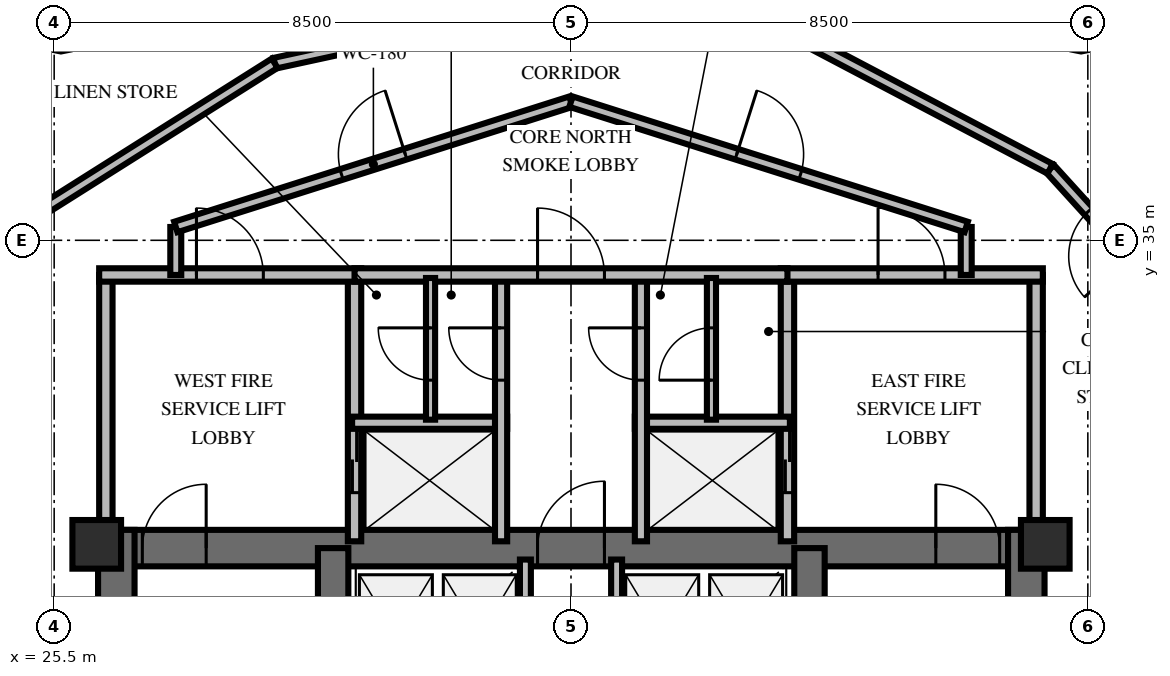
"""IFC4 building model, lengths in metres.
Left out: names, types, materials, properties, quantities, classifications, styles, units other than length and angle.
Written with IfcOpenShell. Run it as: python <this file> out.ifc"""

import sys

from ifc_helpers import new_model, si_unit, direction, frame, frame_2d, origin, origin_2d, place, context, subcontext, project, spatial, rectangle, extrude, element, fill, save


model = new_model("IFC4")
c1 = context("Model", 3, precision=1e-05, world=origin(), true_north=direction((0.0, 1.0)))
c2 = subcontext(c1, "Body", "Model", "MODEL_VIEW")
j1 = project(units=[si_unit("LENGTHUNIT", "METRE"), si_unit("PLANEANGLEUNIT", "RADIAN")], contexts=[c1])
p1 = place(None, origin())
s1 = spatial("IfcSite", under=j1, at=p1, CompositionType="ELEMENT")
p2 = place(p1, origin())
s2 = spatial("IfcBuilding", under=s1, at=p2, CompositionType="ELEMENT")
p3 = place(p2, frame((0.0, 0.0, 248.4)))
s3 = spatial("IfcBuildingStorey", under=s2, at=p3, CompositionType="ELEMENT", Elevation=248.4)
p4 = place(p3, frame((26.222, 29.938, 0.0), z_axis=(0.0, 0.0, 1.0), x_axis=(1.0, 0.0, 0.0)))
e1 = element("IfcWall", 1, at=p4, inside=s3, PredefinedType="SHEAR", context=c2, shape_type="SweptSolid", body=[
    extrude(rectangle(XDim=15.566, YDim=0.6, at=frame_2d((7.783, 0.0))), origin(), (0.0, 0.0, 1.0), 3.6),
])
p5 = place(p4, frame((0.728, 0.0, 0.0)))
e2 = element("IfcOpeningElement", 2, at=p5, cuts=e1, PredefinedType="OPENING", context=c2, shape_type="SweptSolid", body=[
    extrude(rectangle(XDim=1.05, YDim=2.15, at=frame_2d((0.525, 1.075))), frame((0.0, 0.31, 0.0), z_axis=(0.0, -1.0, 0.0), x_axis=(1.0, 0.0, 0.0)), (0.0, 0.0, 1.0), 0.62),
])
p6 = place(p4, frame((13.778, 0.0, 0.0)))
e3 = element("IfcOpeningElement", 3, at=p6, cuts=e1, PredefinedType="OPENING", context=c2, shape_type="SweptSolid", body=[
    extrude(rectangle(XDim=1.05, YDim=2.15, at=frame_2d((0.525, 1.075))), frame((0.0, 0.31, 0.0), z_axis=(0.0, -1.0, 0.0), x_axis=(1.0, 0.0, 0.0)), (0.0, 0.0, 1.0), 0.62),
])
p7 = place(p4, frame((7.228, 0.0, 0.0)))
e4 = element("IfcOpeningElement", 4, at=p7, cuts=e1, PredefinedType="OPENING", context=c2, shape_type="SweptSolid", body=[
    extrude(rectangle(XDim=1.1, YDim=2.15, at=frame_2d((0.55, 1.075))), frame((0.0, 0.31, 0.0), z_axis=(0.0, -1.0, 0.0), x_axis=(1.0, 0.0, 0.0)), (0.0, 0.0, 1.0), 0.62),
])
for number, where, z_axis, x_axis in (
    (5, (26.522, 19.962, 0.0), (0.0, 0.0, 1.0), (0.0, 1.0, 0.0)),
    (6, (41.488, 19.962, 0.0), (0.0, 0.0, 1.0), (0.0, 1.0, 0.0)),
):
    element("IfcWall", number, at=place(p3, frame(where, z_axis=z_axis, x_axis=x_axis)), inside=s3, PredefinedType="SHEAR", context=c2, shape_type="SweptSolid", body=[
        extrude(rectangle(XDim=10.276, YDim=0.6, at=frame_2d((5.138, 0.0))), origin(), (0.0, 0.0, 1.0), 3.6),
    ])
for number, where, z_axis, x_axis in (
    (7, (30.088, 20.262, 0.0), (0.0, 0.0, 1.0), (0.0, 1.0, 0.0)),
    (8, (37.922, 20.262, 0.0), (0.0, 0.0, 1.0), (0.0, 1.0, 0.0)),
):
    element("IfcWall", number, at=place(p3, frame(where, z_axis=z_axis, x_axis=x_axis)), inside=s3, PredefinedType="SHEAR", context=c2, shape_type="SweptSolid", body=[
        extrude(rectangle(XDim=9.676, YDim=0.5, at=frame_2d((4.838, 0.0))), origin(), (0.0, 0.0, 1.0), 3.6),
    ])
for number, where, z_axis, x_axis in (
    (9, (26.2, 30.0, 0.0), (0.0, 0.0, 1.0), (1.0, 0.0, 0.0)),
    (10, (41.8, 30.0, 0.0), (0.0, 0.0, 1.0), (1.0, 0.0, 0.0)),
):
    element("IfcColumn", number, at=place(p3, frame(where, z_axis=z_axis, x_axis=x_axis)), inside=s3, PredefinedType="PILASTER", context=c2, shape_type="SweptSolid", body=[
        extrude(rectangle(XDim=0.8, YDim=0.8, at=origin_2d()), origin(), (0.0, 0.0, 1.0), 3.6),
    ])
p8 = place(p3, frame((26.35, 30.05, 0.0), z_axis=(0.0, 0.0, 1.0), x_axis=(0.0, 1.0, 0.0)))
e11 = element("IfcWall", 11, at=p8, inside=s3, PredefinedType="SOLIDWALL", context=c2, shape_type="SweptSolid", body=[
    extrude(rectangle(XDim=4.38, YDim=0.22, at=frame_2d((2.19, 0.0))), origin(), (0.0, 0.0, 1.0), 2.46),
])
p9 = place(p3, frame((30.44, 30.05, 0.0), z_axis=(0.0, 0.0, 1.0), x_axis=(0.0, 1.0, 0.0)))
e12 = element("IfcWall", 12, at=p9, inside=s3, PredefinedType="SOLIDWALL", context=c2, shape_type="SweptSolid", body=[
    extrude(rectangle(XDim=4.38, YDim=0.22, at=frame_2d((2.19, 0.0))), origin(), (0.0, 0.0, 1.0), 2.46),
])
p10 = place(p9, frame((0.8, 0.0, 0.0)))
e13 = element("IfcOpeningElement", 13, at=p10, cuts=e12, PredefinedType="OPENING", context=c2, shape_type="SweptSolid", body=[
    extrude(rectangle(XDim=1.05, YDim=2.1, at=frame_2d((0.525, 1.05))), frame((0.0, 0.12, 0.0), z_axis=(0.0, -1.0, 0.0), x_axis=(1.0, 0.0, 0.0)), (0.0, 0.0, 1.0), 0.24),
])
p11 = place(p3, frame((26.24, 34.43, 0.0), z_axis=(0.0, 0.0, 1.0), x_axis=(1.0, 0.0, 0.0)))
e14 = element("IfcWall", 14, at=p11, inside=s3, PredefinedType="SOLIDWALL", context=c2, shape_type="SweptSolid", body=[
    extrude(rectangle(XDim=4.31, YDim=0.22, at=frame_2d((2.155, 0.0))), origin(), (0.0, 0.0, 1.0), 2.46),
])
p12 = place(p11, frame((1.6, 0.0, 0.0)))
e15 = element("IfcOpeningElement", 15, at=p12, cuts=e14, PredefinedType="OPENING", context=c2, shape_type="SweptSolid", body=[
    extrude(rectangle(XDim=1.1, YDim=2.15, at=frame_2d((0.55, 1.075))), frame((0.0, 0.12, 0.0), z_axis=(0.0, -1.0, 0.0), x_axis=(1.0, 0.0, 0.0)), (0.0, 0.0, 1.0), 0.24),
])
p13 = place(p3, frame((30.4, 32.0, 0.0), z_axis=(0.0, 0.0, 1.0), x_axis=(1.0, 0.0, 0.0)))
e16 = element("IfcWall", 16, at=p13, inside=s3, PredefinedType="SOLIDWALL", context=c2, shape_type="SweptSolid", body=[
    extrude(rectangle(XDim=2.55, YDim=0.2, at=frame_2d((1.275, 0.0))), origin(), (0.0, 0.0, 1.0), 2.46),
])
p14 = place(p3, frame((32.85, 30.05, 0.0), z_axis=(0.0, 0.0, 1.0), x_axis=(0.0, 1.0, 0.0)))
e17 = element("IfcWall", 17, at=p14, inside=s3, PredefinedType="SOLIDWALL", context=c2, shape_type="SweptSolid", body=[
    extrude(rectangle(XDim=4.38, YDim=0.2, at=frame_2d((2.19, 0.0))), origin(), (0.0, 0.0, 1.0), 2.46),
])
p15 = place(p14, frame((2.65, 0.0, 0.0)))
e18 = element("IfcOpeningElement", 18, at=p15, cuts=e17, PredefinedType="OPENING", context=c2, shape_type="SweptSolid", body=[
    extrude(rectangle(XDim=0.86, YDim=2.05, at=frame_2d((0.43, 1.025))), frame((0.0, 0.11, 0.0), z_axis=(0.0, -1.0, 0.0), x_axis=(1.0, 0.0, 0.0)), (0.0, 0.0, 1.0), 0.22),
])
p16 = place(p3, frame((37.56, 30.05, 0.0), z_axis=(0.0, 0.0, 1.0), x_axis=(0.0, 1.0, 0.0)))
e19 = element("IfcWall", 19, at=p16, inside=s3, PredefinedType="SOLIDWALL", context=c2, shape_type="SweptSolid", body=[
    extrude(rectangle(XDim=4.38, YDim=0.22, at=frame_2d((2.19, 0.0))), origin(), (0.0, 0.0, 1.0), 2.46),
])
p17 = place(p16, frame((0.8, 0.0, 0.0)))
e20 = element("IfcOpeningElement", 20, at=p17, cuts=e19, PredefinedType="OPENING", context=c2, shape_type="SweptSolid", body=[
    extrude(rectangle(XDim=1.05, YDim=2.1, at=frame_2d((0.525, 1.05))), frame((0.0, 0.12, 0.0), z_axis=(0.0, -1.0, 0.0), x_axis=(1.0, 0.0, 0.0)), (0.0, 0.0, 1.0), 0.24),
])
p18 = place(p3, frame((41.65, 30.05, 0.0), z_axis=(0.0, 0.0, 1.0), x_axis=(0.0, 1.0, 0.0)))
e21 = element("IfcWall", 21, at=p18, inside=s3, PredefinedType="SOLIDWALL", context=c2, shape_type="SweptSolid", body=[
    extrude(rectangle(XDim=4.38, YDim=0.22, at=frame_2d((2.19, 0.0))), origin(), (0.0, 0.0, 1.0), 2.46),
])
p19 = place(p3, frame((37.45, 34.43, 0.0), z_axis=(0.0, 0.0, 1.0), x_axis=(1.0, 0.0, 0.0)))
e22 = element("IfcWall", 22, at=p19, inside=s3, PredefinedType="SOLIDWALL", context=c2, shape_type="SweptSolid", body=[
    extrude(rectangle(XDim=4.31, YDim=0.22, at=frame_2d((2.155, 0.0))), origin(), (0.0, 0.0, 1.0), 2.46),
])
p20 = place(p19, frame((1.6, 0.0, 0.0)))
e23 = element("IfcOpeningElement", 23, at=p20, cuts=e22, PredefinedType="OPENING", context=c2, shape_type="SweptSolid", body=[
    extrude(rectangle(XDim=1.1, YDim=2.15, at=frame_2d((0.55, 1.075))), frame((0.0, 0.12, 0.0), z_axis=(0.0, -1.0, 0.0), x_axis=(1.0, 0.0, 0.0)), (0.0, 0.0, 1.0), 0.24),
])
p21 = place(p3, frame((35.05, 32.0, 0.0), z_axis=(0.0, 0.0, 1.0), x_axis=(1.0, 0.0, 0.0)))
e24 = element("IfcWall", 24, at=p21, inside=s3, PredefinedType="SOLIDWALL", context=c2, shape_type="SweptSolid", body=[
    extrude(rectangle(XDim=2.55, YDim=0.2, at=frame_2d((1.275, 0.0))), origin(), (0.0, 0.0, 1.0), 2.46),
])
p22 = place(p3, frame((35.15, 30.05, 0.0), z_axis=(0.0, 0.0, 1.0), x_axis=(0.0, 1.0, 0.0)))
e25 = element("IfcWall", 25, at=p22, inside=s3, PredefinedType="SOLIDWALL", context=c2, shape_type="SweptSolid", body=[
    extrude(rectangle(XDim=4.38, YDim=0.2, at=frame_2d((2.19, 0.0))), origin(), (0.0, 0.0, 1.0), 2.46),
])
p23 = place(p22, frame((2.65, 0.0, 0.0)))
e26 = element("IfcOpeningElement", 26, at=p23, cuts=e25, PredefinedType="OPENING", context=c2, shape_type="SweptSolid", body=[
    extrude(rectangle(XDim=0.86, YDim=2.05, at=frame_2d((0.43, 1.025))), frame((0.0, 0.11, 0.0), z_axis=(0.0, -1.0, 0.0), x_axis=(1.0, 0.0, 0.0)), (0.0, 0.0, 1.0), 0.22),
])
p24 = place(p3, frame((30.44, 34.43, 0.0), z_axis=(0.0, 0.0, 1.0), x_axis=(1.0, 0.0, 0.0)))
e27 = element("IfcWall", 27, at=p24, inside=s3, PredefinedType="SOLIDWALL", context=c2, shape_type="SweptSolid", body=[
    extrude(rectangle(XDim=7.12, YDim=0.22, at=frame_2d((3.56, 0.0))), origin(), (0.0, 0.0, 1.0), 2.46),
])
p25 = place(p24, frame((3.01, 0.0, 0.0)))
e28 = element("IfcOpeningElement", 28, at=p25, cuts=e27, PredefinedType="OPENING", context=c2, shape_type="SweptSolid", body=[
    extrude(rectangle(XDim=1.1, YDim=2.15, at=frame_2d((0.55, 1.075))), frame((0.0, 0.12, 0.0), z_axis=(0.0, -1.0, 0.0), x_axis=(1.0, 0.0, 0.0)), (0.0, 0.0, 1.0), 0.24),
])
p26 = place(p3, frame((31.69, 32.05, 0.0), z_axis=(0.0, 0.0, 1.0), x_axis=(0.0, 1.0, 0.0)))
e29 = element("IfcWall", 29, at=p26, inside=s3, PredefinedType="PARTITIONING", context=c2, shape_type="SweptSolid", body=[
    extrude(rectangle(XDim=2.33, YDim=0.15, at=frame_2d((1.165, 0.0))), origin(), (0.0, 0.0, 1.0), 2.46),
])
p27 = place(p26, frame((0.65, 0.0, 0.0)))
e30 = element("IfcOpeningElement", 30, at=p27, cuts=e29, PredefinedType="OPENING", context=c2, shape_type="SweptSolid", body=[
    extrude(rectangle(XDim=0.86, YDim=2.05, at=frame_2d((0.43, 1.025))), frame((0.0, 0.085, 0.0), z_axis=(0.0, -1.0, 0.0), x_axis=(1.0, 0.0, 0.0)), (0.0, 0.0, 1.0), 0.17),
])
p28 = place(p3, frame((36.31, 32.05, 0.0), z_axis=(0.0, 0.0, 1.0), x_axis=(0.0, 1.0, 0.0)))
e31 = element("IfcWall", 31, at=p28, inside=s3, PredefinedType="PARTITIONING", context=c2, shape_type="SweptSolid", body=[
    extrude(rectangle(XDim=2.33, YDim=0.15, at=frame_2d((1.165, 0.0))), origin(), (0.0, 0.0, 1.0), 2.46),
])
p29 = place(p28, frame((0.65, 0.0, 0.0)))
e32 = element("IfcOpeningElement", 32, at=p29, cuts=e31, PredefinedType="OPENING", context=c2, shape_type="SweptSolid", body=[
    extrude(rectangle(XDim=0.86, YDim=2.05, at=frame_2d((0.43, 1.025))), frame((0.0, 0.085, 0.0), z_axis=(0.0, -1.0, 0.0), x_axis=(1.0, 0.0, 0.0)), (0.0, 0.0, 1.0), 0.17),
])
for number, where, z_axis, x_axis in (
    (33, (33.25, 27.28, 0.0), (0.0, 0.0, 1.0), (0.0, 1.0, 0.0)),
    (34, (34.75, 27.28, 0.0), (0.0, 0.0, 1.0), (0.0, 1.0, 0.0)),
):
    element("IfcWall", number, at=place(p3, frame(where, z_axis=z_axis, x_axis=x_axis)), inside=s3, PredefinedType="SOLIDWALL", context=c2, shape_type="SweptSolid", body=[
        extrude(rectangle(XDim=2.47, YDim=0.18, at=frame_2d((1.235, 0.0))), origin(), (0.0, 0.0, 1.0), 2.46),
    ])
for number, where, z_axis, x_axis in (
    (35, (27.5, 34.43, 0.0), (0.0, 0.0, 1.0), (0.0, 1.0, 0.0)),
    (36, (40.5, 35.219, 0.0), (0.0, 0.0, 1.0), (0.0, -1.0, 0.0)),
):
    element("IfcWall", number, at=place(p3, frame(where, z_axis=z_axis, x_axis=x_axis)), inside=s3, PredefinedType="PARTITIONING", context=c2, shape_type="SweptSolid", body=[
        extrude(rectangle(XDim=0.789, YDim=0.18, at=frame_2d((0.395, 0.0))), origin(), (0.0, 0.0, 1.0), 2.46),
    ])
p30 = place(p3, frame((27.5, 35.219, 0.0), z_axis=(0.0, 0.0, 1.0), x_axis=(0.953228121756, 0.302251795518, 0.0)))
e37 = element("IfcWall", 37, at=p30, inside=s3, PredefinedType="PARTITIONING", context=c2, shape_type="SweptSolid", body=[
    extrude(rectangle(XDim=6.819, YDim=0.18, at=frame_2d((3.409, 0.0))), origin(), (0.0, 0.0, 1.0), 2.46),
])
p31 = place(p30, frame((2.86, 0.0, 0.0)))
e38 = element("IfcOpeningElement", 38, at=p31, cuts=e37, PredefinedType="OPENING", context=c2, shape_type="SweptSolid", body=[
    extrude(rectangle(XDim=1.1, YDim=2.15, at=frame_2d((0.55, 1.075))), frame((0.0, 0.1, 0.0), z_axis=(0.0, -1.0, 0.0), x_axis=(1.0, 0.0, 0.0)), (0.0, 0.0, 1.0), 0.2),
])
p32 = place(p3, frame((34.0, 37.28, 0.0), z_axis=(0.0, 0.0, 1.0), x_axis=(0.953228121756, -0.302251795518, 0.0)))
e39 = element("IfcWall", 39, at=p32, inside=s3, PredefinedType="PARTITIONING", context=c2, shape_type="SweptSolid", body=[
    extrude(rectangle(XDim=6.819, YDim=0.18, at=frame_2d((3.409, 0.0))), origin(), (0.0, 0.0, 1.0), 2.46),
])
p33 = place(p32, frame((2.86, 0.0, 0.0)))
e40 = element("IfcOpeningElement", 40, at=p33, cuts=e39, PredefinedType="OPENING", context=c2, shape_type="SweptSolid", body=[
    extrude(rectangle(XDim=1.1, YDim=2.15, at=frame_2d((0.55, 1.075))), frame((0.0, 0.1, 0.0), z_axis=(0.0, -1.0, 0.0), x_axis=(1.0, 0.0, 0.0)), (0.0, 0.0, 1.0), 0.2),
])
p34 = place(p3, frame((44.885, 32.868, 0.0), z_axis=(0.0, 0.0, 1.0), x_axis=(-0.672373687718, 0.740211877819, 0.0)))
e41 = element("IfcWall", 41, at=p34, inside=s3, PredefinedType="PARTITIONING", context=c2, shape_type="SweptSolid", body=[
    extrude(rectangle(XDim=4.47, YDim=0.18, at=frame_2d((2.235, 0.0))), origin(), (0.0, 0.0, 1.0), 2.46),
])
p35 = place(p34, frame((2.527, 0.0, 0.0)))
e42 = element("IfcOpeningElement", 42, at=p35, cuts=e41, PredefinedType="OPENING", context=c2, shape_type="SweptSolid", body=[
    extrude(rectangle(XDim=1.0, YDim=2.15, at=frame_2d((0.5, 1.075))), frame((0.0, 0.1, 0.0), z_axis=(0.0, -1.0, 0.0), x_axis=(1.0, 0.0, 0.0)), (0.0, 0.0, 1.0), 0.2),
])
p36 = place(p3, frame((41.879, 36.176, 0.0), z_axis=(0.0, 0.0, 1.0), x_axis=(-0.884994042348, 0.465602346437, 0.0)))
e43 = element("IfcWall", 43, at=p36, inside=s3, PredefinedType="PARTITIONING", context=c2, shape_type="SweptSolid", body=[
    extrude(rectangle(XDim=4.469, YDim=0.18, at=frame_2d((2.235, 0.0))), origin(), (0.0, 0.0, 1.0), 2.46),
])
p37 = place(p3, frame((33.495, 38.86, 0.0), z_axis=(0.0, 0.0, 1.0), x_axis=(-0.977225634609, -0.212202872419, 0.0)))
e44 = element("IfcWall", 44, at=p37, inside=s3, PredefinedType="PARTITIONING", context=c2, shape_type="SweptSolid", body=[
    extrude(rectangle(XDim=4.47, YDim=0.18, at=frame_2d((2.235, 0.0))), origin(), (0.0, 0.0, 1.0), 2.46),
])
p38 = place(p3, frame((29.127, 37.912, 0.0), z_axis=(0.0, 0.0, 1.0), x_axis=(-0.845728942712, -0.533612739221, 0.0)))
e45 = element("IfcWall", 45, at=p38, inside=s3, PredefinedType="PARTITIONING", context=c2, shape_type="SweptSolid", body=[
    extrude(rectangle(XDim=4.469, YDim=0.18, at=frame_2d((2.235, 0.0))), origin(), (0.0, 0.0, 1.0), 2.46),
])
p39 = place(p5, origin())
e46 = element("IfcDoor", 46, at=p39, inside=s3, OperationType="SINGLE_SWING_RIGHT", PredefinedType="DOOR", context=c2, shape_type="SweptSolid", body=[
    extrude(rectangle(XDim=1.05, YDim=2.15, at=frame_2d((0.525, 1.075))), frame((0.0, 0.025, 0.0), z_axis=(0.0, -1.0, 0.0), x_axis=(1.0, 0.0, 0.0)), (0.0, 0.0, 1.0), 0.05),
])
fill(e2, e46)
p40 = place(p6, origin())
e47 = element("IfcDoor", 47, at=p40, inside=s3, OperationType="SINGLE_SWING_LEFT", PredefinedType="DOOR", context=c2, shape_type="SweptSolid", body=[
    extrude(rectangle(XDim=1.05, YDim=2.15, at=frame_2d((0.525, 1.075))), frame((0.0, 0.025, 0.0), z_axis=(0.0, -1.0, 0.0), x_axis=(1.0, 0.0, 0.0)), (0.0, 0.0, 1.0), 0.05),
])
fill(e3, e47)
p41 = place(p7, origin())
e48 = element("IfcDoor", 48, at=p41, inside=s3, OperationType="SINGLE_SWING_RIGHT", PredefinedType="DOOR", context=c2, shape_type="SweptSolid", body=[
    extrude(rectangle(XDim=1.1, YDim=2.15, at=frame_2d((0.55, 1.075))), frame((0.0, 0.025, 0.0), z_axis=(0.0, -1.0, 0.0), x_axis=(1.0, 0.0, 0.0)), (0.0, 0.0, 1.0), 0.05),
])
fill(e4, e48)
p42 = place(p12, origin())
e49 = element("IfcDoor", 49, at=p42, inside=s3, OperationType="SINGLE_SWING_LEFT", PredefinedType="DOOR", context=c2, shape_type="SweptSolid", body=[
    extrude(rectangle(XDim=1.1, YDim=2.15, at=frame_2d((0.55, 1.075))), frame((0.0, 0.025, 0.0), z_axis=(0.0, -1.0, 0.0), x_axis=(1.0, 0.0, 0.0)), (0.0, 0.0, 1.0), 0.05),
])
fill(e15, e49)
p43 = place(p10, origin())
e50 = element("IfcDoor", 50, at=p43, inside=s3, OperationType="DOUBLE_DOOR_SLIDING", PredefinedType="USERDEFINED", context=c2, shape_type="SweptSolid", body=[
    extrude(rectangle(XDim=1.05, YDim=2.1, at=frame_2d((0.525, 1.05))), frame((0.0, 0.025, 0.0), z_axis=(0.0, -1.0, 0.0), x_axis=(1.0, 0.0, 0.0)), (0.0, 0.0, 1.0), 0.05),
])
fill(e13, e50)
p44 = place(p15, origin())
e51 = element("IfcDoor", 51, at=p44, inside=s3, OperationType="SINGLE_SWING_RIGHT", PredefinedType="TRAPDOOR", context=c2, shape_type="SweptSolid", body=[
    extrude(rectangle(XDim=0.86, YDim=2.05, at=frame_2d((0.43, 1.025))), frame((0.0, 0.025, 0.0), z_axis=(0.0, -1.0, 0.0), x_axis=(1.0, 0.0, 0.0)), (0.0, 0.0, 1.0), 0.05),
])
fill(e18, e51)
p45 = place(p20, origin())
e52 = element("IfcDoor", 52, at=p45, inside=s3, OperationType="SINGLE_SWING_LEFT", PredefinedType="DOOR", context=c2, shape_type="SweptSolid", body=[
    extrude(rectangle(XDim=1.1, YDim=2.15, at=frame_2d((0.55, 1.075))), frame((0.0, 0.025, 0.0), z_axis=(0.0, -1.0, 0.0), x_axis=(1.0, 0.0, 0.0)), (0.0, 0.0, 1.0), 0.05),
])
fill(e23, e52)
p46 = place(p17, origin())
e53 = element("IfcDoor", 53, at=p46, inside=s3, OperationType="DOUBLE_DOOR_SLIDING", PredefinedType="USERDEFINED", context=c2, shape_type="SweptSolid", body=[
    extrude(rectangle(XDim=1.05, YDim=2.1, at=frame_2d((0.525, 1.05))), frame((0.0, 0.025, 0.0), z_axis=(0.0, -1.0, 0.0), x_axis=(1.0, 0.0, 0.0)), (0.0, 0.0, 1.0), 0.05),
])
fill(e20, e53)
p47 = place(p23, origin())
e54 = element("IfcDoor", 54, at=p47, inside=s3, OperationType="SINGLE_SWING_RIGHT", PredefinedType="TRAPDOOR", context=c2, shape_type="SweptSolid", body=[
    extrude(rectangle(XDim=0.86, YDim=2.05, at=frame_2d((0.43, 1.025))), frame((0.0, 0.025, 0.0), z_axis=(0.0, -1.0, 0.0), x_axis=(1.0, 0.0, 0.0)), (0.0, 0.0, 1.0), 0.05),
])
fill(e26, e54)
p48 = place(p25, origin())
e55 = element("IfcDoor", 55, at=p48, inside=s3, OperationType="SINGLE_SWING_LEFT", PredefinedType="DOOR", context=c2, shape_type="SweptSolid", body=[
    extrude(rectangle(XDim=1.1, YDim=2.15, at=frame_2d((0.55, 1.075))), frame((0.0, 0.025, 0.0), z_axis=(0.0, -1.0, 0.0), x_axis=(1.0, 0.0, 0.0)), (0.0, 0.0, 1.0), 0.05),
])
fill(e28, e55)
p49 = place(p27, origin())
e56 = element("IfcDoor", 56, at=p49, inside=s3, OperationType="SINGLE_SWING_RIGHT", PredefinedType="TRAPDOOR", context=c2, shape_type="SweptSolid", body=[
    extrude(rectangle(XDim=0.86, YDim=2.05, at=frame_2d((0.43, 1.025))), frame((0.0, 0.025, 0.0), z_axis=(0.0, -1.0, 0.0), x_axis=(1.0, 0.0, 0.0)), (0.0, 0.0, 1.0), 0.05),
])
fill(e30, e56)
p50 = place(p29, origin())
e57 = element("IfcDoor", 57, at=p50, inside=s3, OperationType="SINGLE_SWING_LEFT", PredefinedType="TRAPDOOR", context=c2, shape_type="SweptSolid", body=[
    extrude(rectangle(XDim=0.86, YDim=2.05, at=frame_2d((0.43, 1.025))), frame((0.0, 0.025, 0.0), z_axis=(0.0, -1.0, 0.0), x_axis=(1.0, 0.0, 0.0)), (0.0, 0.0, 1.0), 0.05),
])
fill(e32, e57)
p51 = place(p31, origin())
e58 = element("IfcDoor", 58, at=p51, inside=s3, OperationType="SINGLE_SWING_RIGHT", PredefinedType="DOOR", context=c2, shape_type="SweptSolid", body=[
    extrude(rectangle(XDim=1.1, YDim=2.15, at=frame_2d((0.55, 1.075))), frame((0.0, 0.025, 0.0), z_axis=(0.0, -1.0, 0.0), x_axis=(1.0, 0.0, 0.0)), (0.0, 0.0, 1.0), 0.05),
])
fill(e38, e58)
p52 = place(p33, origin())
e59 = element("IfcDoor", 59, at=p52, inside=s3, OperationType="SINGLE_SWING_LEFT", PredefinedType="DOOR", context=c2, shape_type="SweptSolid", body=[
    extrude(rectangle(XDim=1.1, YDim=2.15, at=frame_2d((0.55, 1.075))), frame((0.0, 0.025, 0.0), z_axis=(0.0, -1.0, 0.0), x_axis=(1.0, 0.0, 0.0)), (0.0, 0.0, 1.0), 0.05),
])
fill(e40, e59)
p53 = place(p35, origin())
e60 = element("IfcDoor", 60, at=p53, inside=s3, OperationType="SINGLE_SWING_LEFT", PredefinedType="DOOR", context=c2, shape_type="SweptSolid", body=[
    extrude(rectangle(XDim=1.0, YDim=2.15, at=frame_2d((0.5, 1.075))), frame((0.0, 0.025, 0.0), z_axis=(0.0, -1.0, 0.0), x_axis=(1.0, 0.0, 0.0)), (0.0, 0.0, 1.0), 0.05),
])
fill(e42, e60)
save(model, sys.argv[1])
